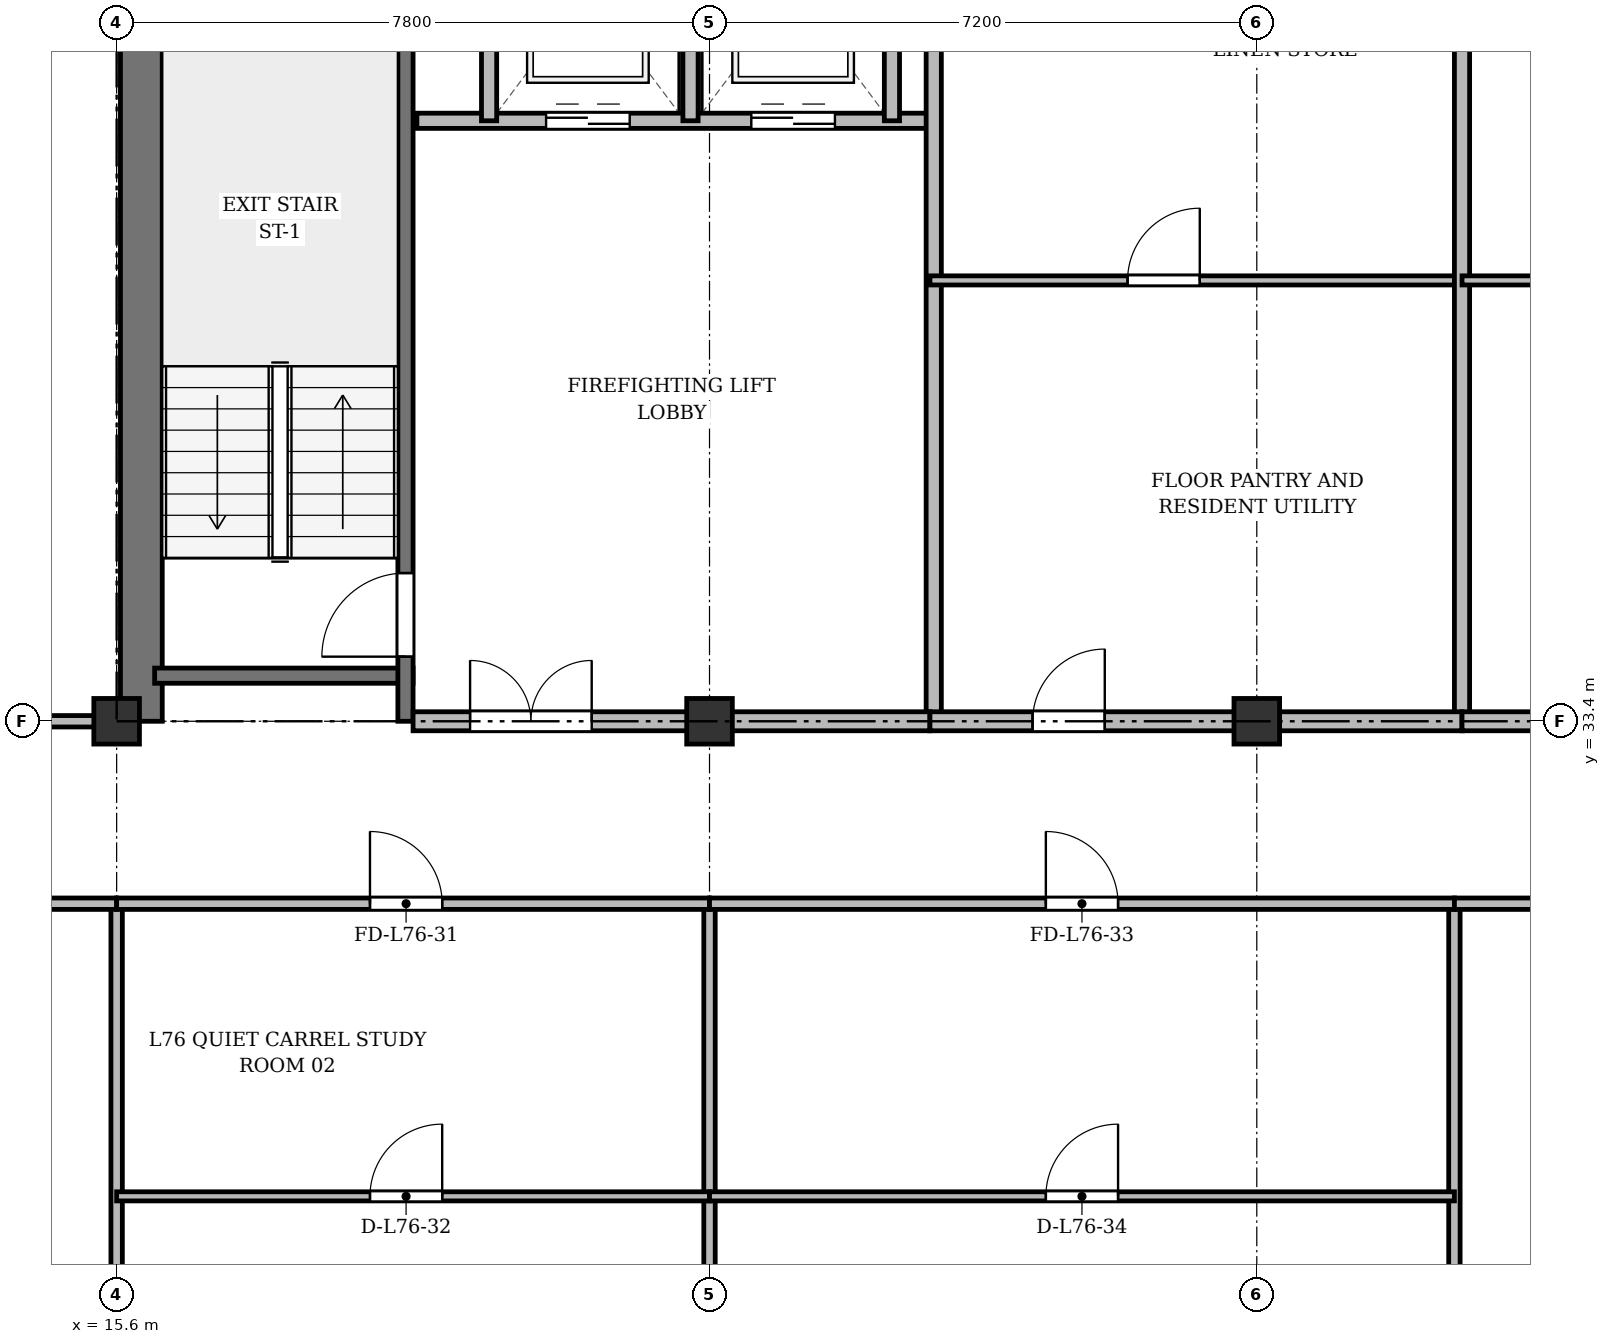
"""IFC4 building model, lengths in metres.
Left out: names, types, materials, properties, quantities, classifications, styles, units other than length and angle.
Written with IfcOpenShell. Run it as: python <this file> out.ifc"""

import sys

from ifc_helpers import new_model, si_unit, direction, frame, frame_2d, origin, origin_2d, place, context, subcontext, project, spatial, rectangle, extrude, source, transform, mapped, element, fill, save


model = new_model("IFC4")
c1 = context("Model", 3, precision=1e-05, world=origin(), true_north=direction((0.0, 1.0)))
c2 = subcontext(c1, "Body", "Model", "MODEL_VIEW")
j1 = project(units=[si_unit("LENGTHUNIT", "METRE"), si_unit("PLANEANGLEUNIT", "RADIAN")], contexts=[c1])
p1 = place(None, origin())
s1 = spatial("IfcSite", under=j1, at=p1, CompositionType="ELEMENT")
p2 = place(p1, origin())
s2 = spatial("IfcBuilding", under=s1, at=p2, CompositionType="ELEMENT")
p3 = place(p2, frame((0.0, 0.0, 291.9)))
s3 = spatial("IfcBuildingStorey", under=s2, at=p3, CompositionType="ELEMENT", Elevation=291.9)
m1 = source(origin(), c2, "Body", "SweptSolid", [
    extrude(rectangle(XDim=0.6, YDim=0.6, at=origin_2d()), origin(), (0.0, 0.0, 1.0), 3.6),
])
for number, where, z_axis, x_axis in (
    (1, (15.6, 33.4, 0.0), (0.0, 0.0, 1.0), (1.0, 0.0, 0.0)),
    (2, (23.4, 33.4, 0.0), (0.0, 0.0, 1.0), (1.0, 0.0, 0.0)),
    (3, (30.6, 33.4, 0.0), (0.0, 0.0, 1.0), (1.0, 0.0, 0.0)),
):
    element("IfcColumn", number, at=place(p3, frame(where, z_axis=z_axis, x_axis=x_axis)), inside=s3, PredefinedType="COLUMN", context=c2, shape_type="MappedRepresentation", body=[
        mapped(m1, transform((0.0, 0.0, 0.0), x_axis=(1.0, 0.0, 0.0), y_axis=(0.0, 1.0, 0.0), z_axis=(0.0, 0.0, 1.0), scale=1.0)),
    ])
p4 = place(p3, frame((15.925, 33.4, 0.0), z_axis=(0.0, 0.0, 1.0), x_axis=(0.0, 1.0, 0.0)))
e4 = element("IfcWall", 4, at=p4, inside=s3, PredefinedType="SHEAR", context=c2, shape_type="SweptSolid", body=[
    extrude(rectangle(XDim=11.55, YDim=0.55, at=frame_2d((5.775, 0.0))), origin(), (0.0, 0.0, 1.0), 3.18),
])
p5 = place(p3, frame((16.1, 34.0, 0.0), z_axis=(0.0, 0.0, 1.0), x_axis=(1.0, 0.0, 0.0)))
e5 = element("IfcWall", 5, at=p5, inside=s3, PredefinedType="SHEAR", context=c2, shape_type="SweptSolid", body=[
    extrude(rectangle(XDim=3.4, YDim=0.2, at=frame_2d((1.7, 0.0))), origin(), (0.0, 0.0, 1.0), 3.18),
])
p6 = place(p3, frame((19.4, 33.4, 0.0), z_axis=(0.0, 0.0, 1.0), x_axis=(0.0, 1.0, 0.0)))
e6 = element("IfcWall", 6, at=p6, inside=s3, PredefinedType="SHEAR", context=c2, shape_type="SweptSolid", body=[
    extrude(rectangle(XDim=11.1, YDim=0.2, at=frame_2d((5.55, 0.0))), origin(), (0.0, 0.0, 1.0), 3.18),
])
p7 = place(p6, frame((0.85, 0.0, 0.0)))
e7 = element("IfcOpeningElement", 7, at=p7, cuts=e6, PredefinedType="OPENING", context=c2, shape_type="SweptSolid", body=[
    extrude(rectangle(XDim=1.1, YDim=2.15, at=frame_2d((0.55, 1.075))), frame((0.0, 0.11, 0.0), z_axis=(0.0, -1.0, 0.0), x_axis=(1.0, 0.0, 0.0)), (0.0, 0.0, 1.0), 0.22),
])
p8 = place(p3, frame((19.55, 41.3, 0.0), z_axis=(0.0, 0.0, 1.0), x_axis=(1.0, 0.0, 0.0)))
e8 = element("IfcWall", 8, at=p8, inside=s3, PredefinedType="SOLIDWALL", context=c2, shape_type="SweptSolid", body=[
    extrude(rectangle(XDim=6.75, YDim=0.2, at=frame_2d((3.375, 0.0))), origin(), (0.0, 0.0, 1.0), 3.18),
])
p9 = place(p8, frame((1.7, 0.0, 0.0)))
e9 = element("IfcOpeningElement", 9, at=p9, cuts=e8, PredefinedType="OPENING", context=c2, shape_type="SweptSolid", body=[
    extrude(rectangle(XDim=1.1, YDim=2.15, at=frame_2d((0.55, 1.075))), frame((0.0, 0.11, 0.0), z_axis=(0.0, -1.0, 0.0), x_axis=(1.0, 0.0, 0.0)), (0.0, 0.0, 1.0), 0.22),
])
p10 = place(p8, frame((4.4, 0.0, 0.0)))
e10 = element("IfcOpeningElement", 10, at=p10, cuts=e8, PredefinedType="OPENING", context=c2, shape_type="SweptSolid", body=[
    extrude(rectangle(XDim=1.1, YDim=2.15, at=frame_2d((0.55, 1.075))), frame((0.0, 0.11, 0.0), z_axis=(0.0, -1.0, 0.0), x_axis=(1.0, 0.0, 0.0)), (0.0, 0.0, 1.0), 0.22),
])
for number, where, z_axis, x_axis in (
    (11, (20.5, 41.3, 0.0), (0.0, 0.0, 1.0), (0.0, 1.0, 0.0)),
    (12, (23.15, 41.3, 0.0), (0.0, 0.0, 1.0), (0.0, 1.0, 0.0)),
    (13, (25.8, 41.3, 0.0), (0.0, 0.0, 1.0), (0.0, 1.0, 0.0)),
):
    element("IfcWall", number, at=place(p3, frame(where, z_axis=z_axis, x_axis=x_axis)), inside=s3, PredefinedType="SOLIDWALL", context=c2, shape_type="SweptSolid", body=[
        extrude(rectangle(XDim=3.4, YDim=0.2, at=frame_2d((1.7, 0.0))), origin(), (0.0, 0.0, 1.0), 3.18),
    ])
p11 = place(p3, frame((26.35, 33.4, 0.0), z_axis=(0.0, 0.0, 1.0), x_axis=(0.0, 1.0, 0.0)))
e14 = element("IfcWall", 14, at=p11, inside=s3, PredefinedType="SOLIDWALL", context=c2, shape_type="SweptSolid", body=[
    extrude(rectangle(XDim=11.3, YDim=0.2, at=frame_2d((5.65, 0.0))), origin(), (0.0, 0.0, 1.0), 2.73),
])
p12 = place(p3, frame((19.5, 33.4, 0.0), z_axis=(0.0, 0.0, 1.0), x_axis=(1.0, 0.0, 0.0)))
e15 = element("IfcWall", 15, at=p12, inside=s3, PredefinedType="PARTITIONING", context=c2, shape_type="SweptSolid", body=[
    extrude(rectangle(XDim=6.8, YDim=0.25, at=frame_2d((3.4, 0.0))), origin(), (0.0, 0.0, 1.0), 2.73),
])
p13 = place(p12, frame((0.75, 0.0, 0.0)))
e16 = element("IfcOpeningElement", 16, at=p13, cuts=e15, PredefinedType="OPENING", context=c2, shape_type="SweptSolid", body=[
    extrude(rectangle(XDim=1.6, YDim=2.2, at=frame_2d((0.8, 1.1))), frame((0.0, 0.135, 0.0), z_axis=(0.0, -1.0, 0.0), x_axis=(1.0, 0.0, 0.0)), (0.0, 0.0, 1.0), 0.27),
])
p14 = place(p3, frame((26.3, 39.2, 0.0), z_axis=(0.0, 0.0, 1.0), x_axis=(1.0, 0.0, 0.0)))
e17 = element("IfcWall", 17, at=p14, inside=s3, PredefinedType="PARTITIONING", context=c2, shape_type="SweptSolid", body=[
    extrude(rectangle(XDim=7.0, YDim=0.12, at=frame_2d((3.5, 0.0))), origin(), (0.0, 0.0, 1.0), 2.68),
])
p15 = place(p14, frame((2.6, 0.0, 0.0)))
e18 = element("IfcOpeningElement", 18, at=p15, cuts=e17, PredefinedType="OPENING", context=c2, shape_type="SweptSolid", body=[
    extrude(rectangle(XDim=0.95, YDim=2.15, at=frame_2d((0.475, 1.075))), frame((0.0, 0.07, 0.0), z_axis=(0.0, -1.0, 0.0), x_axis=(1.0, 0.0, 0.0)), (0.0, 0.0, 1.0), 0.14),
])
p16 = place(p3, frame((33.3, 33.4, 0.0), z_axis=(0.0, 0.0, 1.0), x_axis=(0.0, 1.0, 0.0)))
e19 = element("IfcWall", 19, at=p16, inside=s3, PredefinedType="SOLIDWALL", context=c2, shape_type="SweptSolid", body=[
    extrude(rectangle(XDim=11.3, YDim=0.2, at=frame_2d((5.65, 0.0))), origin(), (0.0, 0.0, 1.0), 2.73),
])
p17 = place(p3, frame((33.3, 39.2, 0.0), z_axis=(0.0, 0.0, 1.0), x_axis=(1.0, 0.0, 0.0)))
e20 = element("IfcWall", 20, at=p17, inside=s3, PredefinedType="PARTITIONING", context=c2, shape_type="SweptSolid", body=[
    extrude(rectangle(XDim=6.8, YDim=0.12, at=frame_2d((3.4, 0.0))), origin(), (0.0, 0.0, 1.0), 3.18),
])
p18 = place(p17, frame((2.6, 0.0, 0.0)))
e21 = element("IfcOpeningElement", 21, at=p18, cuts=e20, PredefinedType="OPENING", context=c2, shape_type="SweptSolid", body=[
    extrude(rectangle(XDim=0.95, YDim=2.15, at=frame_2d((0.475, 1.075))), frame((0.0, 0.07, 0.0), z_axis=(0.0, -1.0, 0.0), x_axis=(1.0, 0.0, 0.0)), (0.0, 0.0, 1.0), 0.14),
])
p19 = place(p3, frame((26.3, 33.4, 0.0), z_axis=(0.0, 0.0, 1.0), x_axis=(1.0, 0.0, 0.0)))
e22 = element("IfcWall", 22, at=p19, inside=s3, PredefinedType="PARTITIONING", context=c2, shape_type="SweptSolid", body=[
    extrude(rectangle(XDim=7.0, YDim=0.25, at=frame_2d((3.5, 0.0))), origin(), (0.0, 0.0, 1.0), 2.73),
])
p20 = place(p19, frame((1.35, 0.0, 0.0)))
e23 = element("IfcOpeningElement", 23, at=p20, cuts=e22, PredefinedType="OPENING", context=c2, shape_type="SweptSolid", body=[
    extrude(rectangle(XDim=0.95, YDim=2.15, at=frame_2d((0.475, 1.075))), frame((0.0, 0.135, 0.0), z_axis=(0.0, -1.0, 0.0), x_axis=(1.0, 0.0, 0.0)), (0.0, 0.0, 1.0), 0.27),
])
p21 = place(p3, frame((33.3, 33.4, 0.0), z_axis=(0.0, 0.0, 1.0), x_axis=(1.0, 0.0, 0.0)))
e24 = element("IfcWall", 24, at=p21, inside=s3, PredefinedType="PARTITIONING", context=c2, shape_type="SweptSolid", body=[
    extrude(rectangle(XDim=6.8, YDim=0.25, at=frame_2d((3.4, 0.0))), origin(), (0.0, 0.0, 1.0), 2.73),
])
p22 = place(p21, frame((2.4, 0.0, 0.0)))
e25 = element("IfcOpeningElement", 25, at=p22, cuts=e24, PredefinedType="OPENING", context=c2, shape_type="SweptSolid", body=[
    extrude(rectangle(XDim=1.0, YDim=2.15, at=frame_2d((0.5, 1.075))), frame((0.0, 0.135, 0.0), z_axis=(0.0, -1.0, 0.0), x_axis=(1.0, 0.0, 0.0)), (0.0, 0.0, 1.0), 0.27),
])
p23 = place(p3, frame((8.45, 33.4, 0.0), z_axis=(0.0, 0.0, 1.0), x_axis=(1.0, 0.0, 0.0)))
e26 = element("IfcWall", 26, at=p23, inside=s3, PredefinedType="PARTITIONING", context=c2, shape_type="SweptSolid", body=[
    extrude(rectangle(XDim=7.15, YDim=0.15, at=frame_2d((3.575, 0.0))), origin(), (0.0, 0.0, 1.0), 2.53),
])
p24 = place(p23, frame((3.0, 0.0, 0.0)))
e27 = element("IfcOpeningElement", 27, at=p24, cuts=e26, PredefinedType="OPENING", context=c2, shape_type="SweptSolid", body=[
    extrude(rectangle(XDim=0.95, YDim=2.15, at=frame_2d((0.475, 1.075))), frame((0.0, 0.085, 0.0), z_axis=(0.0, -1.0, 0.0), x_axis=(1.0, 0.0, 0.0)), (0.0, 0.0, 1.0), 0.17),
])
p25 = place(p3, frame((15.6, 3.725, 0.0), z_axis=(0.0, 0.0, 1.0), x_axis=(0.0, 1.0, 0.0)))
e28 = element("IfcWall", 28, at=p25, inside=s3, PredefinedType="PARTITIONING", context=c2, shape_type="SweptSolid", body=[
    extrude(rectangle(XDim=27.275, YDim=0.15, at=frame_2d((13.637, 0.0))), origin(), (0.0, 0.0, 1.0), 2.53),
])
p26 = place(p3, frame((23.4, 3.725, 0.0), z_axis=(0.0, 0.0, 1.0), x_axis=(0.0, 1.0, 0.0)))
e29 = element("IfcWall", 29, at=p26, inside=s3, PredefinedType="PARTITIONING", context=c2, shape_type="SweptSolid", body=[
    extrude(rectangle(XDim=27.275, YDim=0.15, at=frame_2d((13.637, 0.0))), origin(), (0.0, 0.0, 1.0), 2.68),
])
p27 = place(p3, frame((33.2, 7.01, 0.0), z_axis=(0.0, 0.0, 1.0), x_axis=(0.0, 1.0, 0.0)))
e30 = element("IfcWall", 30, at=p27, inside=s3, PredefinedType="PARTITIONING", context=c2, shape_type="SweptSolid", body=[
    extrude(rectangle(XDim=23.99, YDim=0.15, at=frame_2d((11.995, 0.0))), origin(), (0.0, 0.0, 1.0), 2.73),
])
p28 = place(p3, frame((8.425, 31.0, 0.0), z_axis=(0.0, 0.0, 1.0), x_axis=(1.0, 0.0, 0.0)))
e31 = element("IfcWall", 31, at=p28, inside=s3, PredefinedType="PARTITIONING", context=c2, shape_type="SweptSolid", body=[
    extrude(rectangle(XDim=7.175, YDim=0.15, at=frame_2d((3.587, 0.0))), origin(), (0.0, 0.0, 1.0), 2.53),
])
p29 = place(p28, frame((4.681, 0.0, 0.0)))
e32 = element("IfcOpeningElement", 32, at=p29, cuts=e31, PredefinedType="OPENING", context=c2, shape_type="SweptSolid", body=[
    extrude(rectangle(XDim=0.95, YDim=2.15, at=frame_2d((0.475, 1.075))), frame((0.0, 0.085, 0.0), z_axis=(0.0, -1.0, 0.0), x_axis=(1.0, 0.0, 0.0)), (0.0, 0.0, 1.0), 0.17),
])
p30 = place(p3, frame((15.6, 31.0, 0.0), z_axis=(0.0, 0.0, 1.0), x_axis=(1.0, 0.0, 0.0)))
e33 = element("IfcWall", 33, at=p30, inside=s3, PredefinedType="PARTITIONING", context=c2, shape_type="SweptSolid", body=[
    extrude(rectangle(XDim=7.8, YDim=0.15, at=frame_2d((3.9, 0.0))), origin(), (0.0, 0.0, 1.0), 2.68),
])
p31 = place(p30, frame((3.333, 0.0, 0.0)))
e34 = element("IfcOpeningElement", 34, at=p31, cuts=e33, PredefinedType="OPENING", context=c2, shape_type="SweptSolid", body=[
    extrude(rectangle(XDim=0.95, YDim=2.15, at=frame_2d((0.475, 1.075))), frame((0.0, 0.085, 0.0), z_axis=(0.0, -1.0, 0.0), x_axis=(1.0, 0.0, 0.0)), (0.0, 0.0, 1.0), 0.17),
])
p32 = place(p3, frame((15.6, 27.15, 0.0), z_axis=(0.0, 0.0, 1.0), x_axis=(1.0, 0.0, 0.0)))
e35 = element("IfcWall", 35, at=p32, inside=s3, PredefinedType="PARTITIONING", context=c2, shape_type="SweptSolid", body=[
    extrude(rectangle(XDim=7.8, YDim=0.12, at=frame_2d((3.9, 0.0))), origin(), (0.0, 0.0, 1.0), 2.68),
])
p33 = place(p32, frame((3.333, 0.0, 0.0)))
e36 = element("IfcOpeningElement", 36, at=p33, cuts=e35, PredefinedType="OPENING", context=c2, shape_type="SweptSolid", body=[
    extrude(rectangle(XDim=0.95, YDim=2.15, at=frame_2d((0.475, 1.075))), frame((0.0, 0.07, 0.0), z_axis=(0.0, -1.0, 0.0), x_axis=(1.0, 0.0, 0.0)), (0.0, 0.0, 1.0), 0.14),
])
p34 = place(p3, frame((23.4, 31.0, 0.0), z_axis=(0.0, 0.0, 1.0), x_axis=(1.0, 0.0, 0.0)))
e37 = element("IfcWall", 37, at=p34, inside=s3, PredefinedType="PARTITIONING", context=c2, shape_type="SweptSolid", body=[
    extrude(rectangle(XDim=9.8, YDim=0.15, at=frame_2d((4.9, 0.0))), origin(), (0.0, 0.0, 1.0), 2.68),
])
p35 = place(p34, frame((4.425, 0.0, 0.0)))
e38 = element("IfcOpeningElement", 38, at=p35, cuts=e37, PredefinedType="OPENING", context=c2, shape_type="SweptSolid", body=[
    extrude(rectangle(XDim=0.95, YDim=2.15, at=frame_2d((0.475, 1.075))), frame((0.0, 0.085, 0.0), z_axis=(0.0, -1.0, 0.0), x_axis=(1.0, 0.0, 0.0)), (0.0, 0.0, 1.0), 0.17),
])
p36 = place(p3, frame((23.4, 27.15, 0.0), z_axis=(0.0, 0.0, 1.0), x_axis=(1.0, 0.0, 0.0)))
e39 = element("IfcWall", 39, at=p36, inside=s3, PredefinedType="PARTITIONING", context=c2, shape_type="SweptSolid", body=[
    extrude(rectangle(XDim=9.8, YDim=0.12, at=frame_2d((4.9, 0.0))), origin(), (0.0, 0.0, 1.0), 2.68),
])
p37 = place(p36, frame((4.425, 0.0, 0.0)))
e40 = element("IfcOpeningElement", 40, at=p37, cuts=e39, PredefinedType="OPENING", context=c2, shape_type="SweptSolid", body=[
    extrude(rectangle(XDim=0.95, YDim=2.15, at=frame_2d((0.475, 1.075))), frame((0.0, 0.07, 0.0), z_axis=(0.0, -1.0, 0.0), x_axis=(1.0, 0.0, 0.0)), (0.0, 0.0, 1.0), 0.14),
])
p38 = place(p3, frame((33.2, 31.0, 0.0), z_axis=(0.0, 0.0, 1.0), x_axis=(1.0, 0.0, 0.0)))
e41 = element("IfcWall", 41, at=p38, inside=s3, PredefinedType="PARTITIONING", context=c2, shape_type="SweptSolid", body=[
    extrude(rectangle(XDim=10.6, YDim=0.15, at=frame_2d((5.3, 0.0))), origin(), (0.0, 0.0, 1.0), 2.68),
])
p39 = place(p38, frame((4.408, 0.0, 0.0)))
e42 = element("IfcOpeningElement", 42, at=p39, cuts=e41, PredefinedType="OPENING", context=c2, shape_type="SweptSolid", body=[
    extrude(rectangle(XDim=1.6, YDim=2.2, at=frame_2d((0.8, 1.1))), frame((0.0, 0.085, 0.0), z_axis=(0.0, -1.0, 0.0), x_axis=(1.0, 0.0, 0.0)), (0.0, 0.0, 1.0), 0.17),
])
m2 = source(origin(), c2, "Body", "SweptSolid", [
    extrude(rectangle(XDim=1.1, YDim=2.15, at=frame_2d((0.55, 1.075))), frame((0.0, 0.025, 0.0), z_axis=(0.0, -1.0, 0.0), x_axis=(1.0, 0.0, 0.0)), (0.0, 0.0, 1.0), 0.05),
])
p40 = place(p7, origin())
e43 = element("IfcDoor", 43, at=p40, inside=s3, OperationType="SINGLE_SWING_LEFT", PredefinedType="DOOR", context=c2, shape_type="MappedRepresentation", body=[
    mapped(m2, transform((0.0, 0.0, 0.0), x_axis=(1.0, 0.0, 0.0), y_axis=(0.0, 1.0, 0.0), z_axis=(0.0, 0.0, 1.0), scale=1.0)),
])
fill(e7, e43)
p41 = place(p9, origin())
e44 = element("IfcDoor", 44, at=p41, inside=s3, OperationType="DOUBLE_DOOR_SLIDING", PredefinedType="DOOR", context=c2, shape_type="MappedRepresentation", body=[
    mapped(m2, transform((0.0, 0.0, 0.0), x_axis=(1.0, 0.0, 0.0), y_axis=(0.0, 1.0, 0.0), z_axis=(0.0, 0.0, 1.0), scale=1.0)),
])
fill(e9, e44)
p42 = place(p10, origin())
e45 = element("IfcDoor", 45, at=p42, inside=s3, OperationType="DOUBLE_DOOR_SLIDING", PredefinedType="DOOR", context=c2, shape_type="MappedRepresentation", body=[
    mapped(m2, transform((0.0, 0.0, 0.0), x_axis=(1.0, 0.0, 0.0), y_axis=(0.0, 1.0, 0.0), z_axis=(0.0, 0.0, 1.0), scale=1.0)),
])
fill(e10, e45)
m3 = source(origin(), c2, "Body", "SweptSolid", [
    extrude(rectangle(XDim=1.6, YDim=2.2, at=frame_2d((0.8, 1.1))), frame((0.0, 0.025, 0.0), z_axis=(0.0, -1.0, 0.0), x_axis=(1.0, 0.0, 0.0)), (0.0, 0.0, 1.0), 0.05),
])
p43 = place(p13, origin())
e46 = element("IfcDoor", 46, at=p43, inside=s3, OperationType="DOUBLE_DOOR_SINGLE_SWING", PredefinedType="DOOR", context=c2, shape_type="MappedRepresentation", body=[
    mapped(m3, transform((0.0, 0.0, 0.0), x_axis=(1.0, 0.0, 0.0), y_axis=(0.0, 1.0, 0.0), z_axis=(0.0, 0.0, 1.0), scale=1.0)),
])
fill(e16, e46)
m4 = source(origin(), c2, "Body", "SweptSolid", [
    extrude(rectangle(XDim=0.95, YDim=2.15, at=frame_2d((0.475, 1.075))), frame((0.0, 0.025, 0.0), z_axis=(0.0, -1.0, 0.0), x_axis=(1.0, 0.0, 0.0)), (0.0, 0.0, 1.0), 0.05),
])
p44 = place(p15, origin())
e47 = element("IfcDoor", 47, at=p44, inside=s3, OperationType="SINGLE_SWING_RIGHT", PredefinedType="DOOR", context=c2, shape_type="MappedRepresentation", body=[
    mapped(m4, transform((0.0, 0.0, 0.0), x_axis=(1.0, 0.0, 0.0), y_axis=(0.0, 1.0, 0.0), z_axis=(0.0, 0.0, 1.0), scale=1.0)),
])
fill(e18, e47)
p45 = place(p20, origin())
e48 = element("IfcDoor", 48, at=p45, inside=s3, OperationType="SINGLE_SWING_RIGHT", PredefinedType="DOOR", context=c2, shape_type="MappedRepresentation", body=[
    mapped(m4, transform((0.0, 0.0, 0.0), x_axis=(1.0, 0.0, 0.0), y_axis=(0.0, 1.0, 0.0), z_axis=(0.0, 0.0, 1.0), scale=1.0)),
])
fill(e23, e48)
p46 = place(p31, origin())
e49 = element("IfcDoor", 49, at=p46, inside=s3, OperationType="SINGLE_SWING_LEFT", PredefinedType="DOOR", context=c2, shape_type="MappedRepresentation", body=[
    mapped(m4, transform((0.0, 0.0, 0.0), x_axis=(1.0, 0.0, 0.0), y_axis=(0.0, 1.0, 0.0), z_axis=(0.0, 0.0, 1.0), scale=1.0)),
])
fill(e34, e49)
p47 = place(p33, origin())
e50 = element("IfcDoor", 50, at=p47, inside=s3, OperationType="SINGLE_SWING_RIGHT", PredefinedType="DOOR", context=c2, shape_type="MappedRepresentation", body=[
    mapped(m4, transform((0.0, 0.0, 0.0), x_axis=(1.0, 0.0, 0.0), y_axis=(0.0, 1.0, 0.0), z_axis=(0.0, 0.0, 1.0), scale=1.0)),
])
fill(e36, e50)
p48 = place(p35, origin())
e51 = element("IfcDoor", 51, at=p48, inside=s3, OperationType="SINGLE_SWING_LEFT", PredefinedType="DOOR", context=c2, shape_type="MappedRepresentation", body=[
    mapped(m4, transform((0.0, 0.0, 0.0), x_axis=(1.0, 0.0, 0.0), y_axis=(0.0, 1.0, 0.0), z_axis=(0.0, 0.0, 1.0), scale=1.0)),
])
fill(e38, e51)
p49 = place(p37, origin())
e52 = element("IfcDoor", 52, at=p49, inside=s3, OperationType="SINGLE_SWING_RIGHT", PredefinedType="DOOR", context=c2, shape_type="MappedRepresentation", body=[
    mapped(m4, transform((0.0, 0.0, 0.0), x_axis=(1.0, 0.0, 0.0), y_axis=(0.0, 1.0, 0.0), z_axis=(0.0, 0.0, 1.0), scale=1.0)),
])
fill(e40, e52)
save(model, sys.argv[1])
